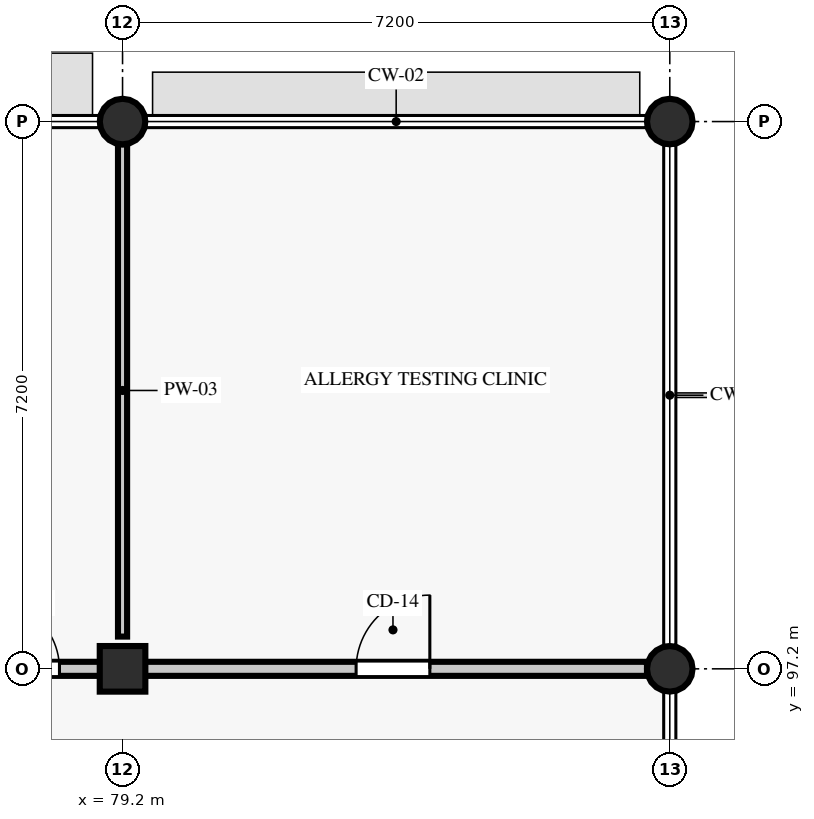
"""IFC4 building model, lengths in metres.
Left out: names, types, materials, properties, quantities, classifications, styles, units other than length and angle.
Written with IfcOpenShell. Run it as: python <this file> out.ifc"""

import sys

from ifc_helpers import new_model, si_unit, direction, frame, frame_2d, origin, origin_2d, place, context, subcontext, project, spatial, rectangle, circle, extrude, element, fill, save


model = new_model("IFC4")
c1 = context("Model", 3, precision=1e-05, world=origin(), true_north=direction((0.0, 1.0)))
c2 = subcontext(c1, "Body", "Model", "MODEL_VIEW")
j1 = project(units=[si_unit("LENGTHUNIT", "METRE"), si_unit("PLANEANGLEUNIT", "RADIAN")], contexts=[c1])
p1 = place(None, origin())
s1 = spatial("IfcSite", under=j1, at=p1, CompositionType="ELEMENT")
p2 = place(p1, origin())
s2 = spatial("IfcBuilding", under=s1, at=p2, CompositionType="ELEMENT")
p3 = place(p2, frame((0.0, 0.0, 13.8)))
s3 = spatial("IfcBuildingStorey", under=s2, at=p3, CompositionType="ELEMENT", Elevation=13.8)
p4 = place(p3, frame((79.2, 97.2, 0.0), z_axis=(0.0, 0.0, 1.0), x_axis=(1.0, 0.0, 0.0)))
e1 = element("IfcColumn", 1, at=p4, inside=s3, PredefinedType="COLUMN", context=c2, shape_type="SweptSolid", body=[
    extrude(rectangle(XDim=0.6, YDim=0.6, at=origin_2d()), origin(), (0.0, 0.0, 1.0), 3.945),
])
for number, where, z_axis, x_axis in (
    (2, (79.2, 104.4, 0.0), (0.0, 0.0, 1.0), (1.0, 0.0, 0.0)),
    (3, (86.4, 97.2, 0.0), (0.0, 0.0, 1.0), (1.0, 0.0, 0.0)),
    (4, (86.4, 104.4, 0.0), (0.0, 0.0, 1.0), (1.0, 0.0, 0.0)),
):
    element("IfcColumn", number, at=place(p3, frame(where, z_axis=z_axis, x_axis=x_axis)), inside=s3, PredefinedType="COLUMN", context=c2, shape_type="SweptSolid", body=[
        extrude(circle(Radius=0.3, at=origin_2d()), origin(), (0.0, 0.0, 1.0), 3.945),
    ])
p5 = place(p3, frame((50.7, 97.2, 0.0), z_axis=(0.0, 0.0, 1.0), x_axis=(1.0, 0.0, 0.0)))
e5 = element("IfcWall", 5, at=p5, inside=s3, PredefinedType="PARTITIONING", context=c2, shape_type="SweptSolid", body=[
    extrude(rectangle(XDim=35.4, YDim=0.185, at=frame_2d((17.7, 0.0))), origin(), (0.0, 0.0, 1.0), 3.195),
])
p6 = place(p5, frame((3.124, 0.0, 0.0)))
e6 = element("IfcOpeningElement", 6, at=p6, cuts=e5, PredefinedType="OPENING", context=c2, shape_type="SweptSolid", body=[
    extrude(rectangle(XDim=0.9, YDim=2.13, at=frame_2d((0.45, 1.065))), frame((0.0, 0.103, 0.0), z_axis=(0.0, -1.0, 0.0), x_axis=(1.0, 0.0, 0.0)), (0.0, 0.0, 1.0), 0.205),
])
p7 = place(p5, frame((8.686, 0.0, 0.0)))
e7 = element("IfcOpeningElement", 7, at=p7, cuts=e5, PredefinedType="OPENING", context=c2, shape_type="SweptSolid", body=[
    extrude(rectangle(XDim=0.95, YDim=2.13, at=frame_2d((0.475, 1.065))), frame((0.0, 0.103, 0.0), z_axis=(0.0, -1.0, 0.0), x_axis=(1.0, 0.0, 0.0)), (0.0, 0.0, 1.0), 0.205),
])
p8 = place(p5, frame((10.341, 0.0, 0.0)))
e8 = element("IfcOpeningElement", 8, at=p8, cuts=e5, PredefinedType="OPENING", context=c2, shape_type="SweptSolid", body=[
    extrude(rectangle(XDim=1.0, YDim=2.13, at=frame_2d((0.5, 1.065))), frame((0.0, 0.103, 0.0), z_axis=(0.0, -1.0, 0.0), x_axis=(1.0, 0.0, 0.0)), (0.0, 0.0, 1.0), 0.205),
])
p9 = place(p5, frame((17.153, 0.0, 0.0)))
e9 = element("IfcOpeningElement", 9, at=p9, cuts=e5, PredefinedType="OPENING", context=c2, shape_type="SweptSolid", body=[
    extrude(rectangle(XDim=1.05, YDim=2.13, at=frame_2d((0.525, 1.065))), frame((0.0, 0.103, 0.0), z_axis=(0.0, -1.0, 0.0), x_axis=(1.0, 0.0, 0.0)), (0.0, 0.0, 1.0), 0.205),
])
p10 = place(p5, frame((22.28, 0.0, 0.0)))
e10 = element("IfcOpeningElement", 10, at=p10, cuts=e5, PredefinedType="OPENING", context=c2, shape_type="SweptSolid", body=[
    extrude(rectangle(XDim=0.92, YDim=2.18, at=frame_2d((0.46, 1.09))), frame((0.0, 0.103, 0.0), z_axis=(0.0, -1.0, 0.0), x_axis=(1.0, 0.0, 0.0)), (0.0, 0.0, 1.0), 0.205),
])
p11 = place(p5, frame((24.48, 0.0, 0.0)))
e11 = element("IfcOpeningElement", 11, at=p11, cuts=e5, PredefinedType="OPENING", context=c2, shape_type="SweptSolid", body=[
    extrude(rectangle(XDim=0.94, YDim=2.08, at=frame_2d((0.47, 1.04))), frame((0.0, 0.103, 0.0), z_axis=(0.0, -1.0, 0.0), x_axis=(1.0, 0.0, 0.0)), (0.0, 0.0, 1.0), 0.205),
])
p12 = place(p5, frame((26.77, 0.0, 0.0)))
e12 = element("IfcOpeningElement", 12, at=p12, cuts=e5, PredefinedType="OPENING", context=c2, shape_type="SweptSolid", body=[
    extrude(rectangle(XDim=0.9, YDim=2.08, at=frame_2d((0.45, 1.04))), frame((0.0, 0.103, 0.0), z_axis=(0.0, -1.0, 0.0), x_axis=(1.0, 0.0, 0.0)), (0.0, 0.0, 1.0), 0.205),
])
p13 = place(p5, frame((31.573, 0.0, 0.0)))
e13 = element("IfcOpeningElement", 13, at=p13, cuts=e5, PredefinedType="OPENING", context=c2, shape_type="SweptSolid", body=[
    extrude(rectangle(XDim=0.97, YDim=2.18, at=frame_2d((0.485, 1.09))), frame((0.0, 0.103, 0.0), z_axis=(0.0, -1.0, 0.0), x_axis=(1.0, 0.0, 0.0)), (0.0, 0.0, 1.0), 0.205),
])
p14 = place(p3, frame((79.2, 97.624, 0.0), z_axis=(0.0, 0.0, 1.0), x_axis=(0.0, 1.0, 0.0)))
e14 = element("IfcWall", 14, at=p14, inside=s3, PredefinedType="PARTITIONING", context=c2, shape_type="SweptSolid", body=[
    extrude(rectangle(XDim=6.476, YDim=0.12, at=frame_2d((3.238, 0.0))), origin(), (0.0, 0.0, 1.0), 3.395),
])
p15 = place(p12, origin())
e15 = element("IfcDoor", 15, at=p15, inside=s3, OperationType="SINGLE_SWING_LEFT", PredefinedType="DOOR", context=c2, shape_type="SweptSolid", body=[
    extrude(rectangle(XDim=0.9, YDim=2.08, at=frame_2d((0.45, 1.04))), frame((0.0, 0.025, 0.0), z_axis=(0.0, -1.0, 0.0), x_axis=(1.0, 0.0, 0.0)), (0.0, 0.0, 1.0), 0.05),
])
fill(e12, e15)
p16 = place(p13, origin())
e16 = element("IfcDoor", 16, at=p16, inside=s3, OperationType="SINGLE_SWING_RIGHT", PredefinedType="DOOR", context=c2, shape_type="SweptSolid", body=[
    extrude(rectangle(XDim=0.97, YDim=2.18, at=frame_2d((0.485, 1.09))), frame((0.0, 0.025, 0.0), z_axis=(0.0, -1.0, 0.0), x_axis=(1.0, 0.0, 0.0)), (0.0, 0.0, 1.0), 0.05),
])
fill(e13, e16)
save(model, sys.argv[1])
